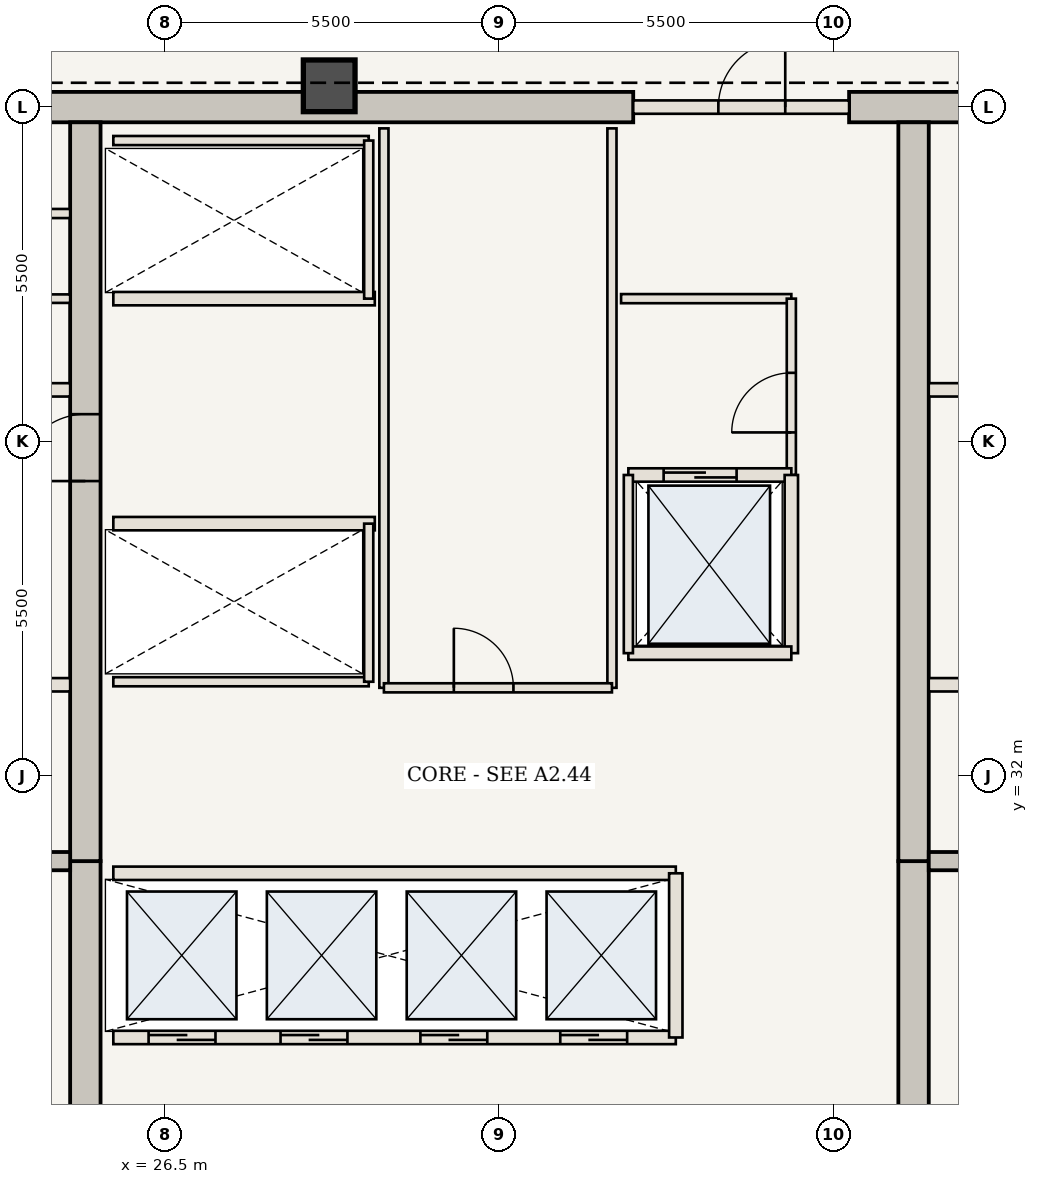
"""IFC4 building model, lengths in metres.
Left out: names, types, materials, properties, quantities, classifications, styles, units other than length and angle.
Written with IfcOpenShell. Run it as: python <this file> out.ifc"""

import sys

from ifc_helpers import new_model, si_unit, direction, frame, frame_2d, origin, origin_2d, place, context, subcontext, project, spatial, rectangle, extrude, element, fill, save


model = new_model("IFC4")
c1 = context("Model", 3, precision=1e-05, world=origin(), true_north=direction((0.0, 1.0)))
c2 = subcontext(c1, "Body", "Model", "MODEL_VIEW")
j1 = project(units=[si_unit("LENGTHUNIT", "METRE"), si_unit("PLANEANGLEUNIT", "RADIAN")], contexts=[c1])
p1 = place(None, origin())
s1 = spatial("IfcSite", under=j1, at=p1, CompositionType="ELEMENT")
p2 = place(p1, origin())
s2 = spatial("IfcBuilding", under=s1, at=p2, CompositionType="ELEMENT")
p3 = place(p2, frame((0.0, 0.0, 198.45)))
s3 = spatial("IfcBuildingStorey", under=s2, at=p3, CompositionType="ELEMENT", Elevation=198.45)
p4 = place(p3, frame((21.41, 43.0, 0.0), z_axis=(0.0, 0.0, 1.0), x_axis=(1.0, 0.0, 0.0)))
e1 = element("IfcWall", 1, at=p4, inside=s3, PredefinedType="SHEAR", context=c2, shape_type="SweptSolid", body=[
    extrude(rectangle(XDim=12.79, YDim=0.5, at=frame_2d((6.395, 0.0))), origin(), (0.0, 0.0, 1.0), 3.85),
])
p5 = place(p3, frame((37.75, 43.0, 0.0), z_axis=(0.0, 0.0, 1.0), x_axis=(1.0, 0.0, 0.0)))
e2 = element("IfcWall", 2, at=p5, inside=s3, PredefinedType="SHEAR", context=c2, shape_type="SweptSolid", body=[
    extrude(rectangle(XDim=4.84, YDim=0.5, at=frame_2d((2.42, 0.0))), origin(), (0.0, 0.0, 1.0), 3.85),
])
p6 = place(p3, frame((25.19, 21.2, 0.0), z_axis=(0.0, 0.0, 1.0), x_axis=(0.0, 1.0, 0.0)))
e3 = element("IfcWall", 3, at=p6, inside=s3, PredefinedType="SHEAR", context=c2, shape_type="SweptSolid", body=[
    extrude(rectangle(XDim=9.4, YDim=0.5, at=frame_2d((4.7, 0.0))), origin(), (0.0, 0.0, 1.0), 3.85),
])
p7 = place(p3, frame((25.19, 30.6, 0.0), z_axis=(0.0, 0.0, 1.0), x_axis=(0.0, 1.0, 0.0)))
e4 = element("IfcWall", 4, at=p7, inside=s3, PredefinedType="SHEAR", context=c2, shape_type="SweptSolid", body=[
    extrude(rectangle(XDim=12.15, YDim=0.5, at=frame_2d((6.075, 0.0))), origin(), (0.0, 0.0, 1.0), 3.85),
])
p8 = place(p7, frame((6.25, 0.0, 0.0)))
e5 = element("IfcOpeningElement", 5, at=p8, cuts=e4, PredefinedType="OPENING", context=c2, shape_type="SweptSolid", body=[
    extrude(rectangle(XDim=1.1, YDim=2.15, at=frame_2d((0.55, 1.075))), frame((0.0, 0.26, 0.0), z_axis=(0.0, -1.0, 0.0), x_axis=(1.0, 0.0, 0.0)), (0.0, 0.0, 1.0), 0.52),
])
p9 = place(p3, frame((38.81, 21.2, 0.0), z_axis=(0.0, 0.0, 1.0), x_axis=(0.0, 1.0, 0.0)))
e6 = element("IfcWall", 6, at=p9, inside=s3, PredefinedType="SHEAR", context=c2, shape_type="SweptSolid", body=[
    extrude(rectangle(XDim=9.4, YDim=0.5, at=frame_2d((4.7, 0.0))), origin(), (0.0, 0.0, 1.0), 3.85),
])
p10 = place(p3, frame((38.81, 30.6, 0.0), z_axis=(0.0, 0.0, 1.0), x_axis=(0.0, 1.0, 0.0)))
e7 = element("IfcWall", 7, at=p10, inside=s3, PredefinedType="SHEAR", context=c2, shape_type="SweptSolid", body=[
    extrude(rectangle(XDim=12.15, YDim=0.5, at=frame_2d((6.075, 0.0))), origin(), (0.0, 0.0, 1.0), 3.85),
])
p11 = place(p3, frame((29.2, 43.35, 0.0), z_axis=(0.0, 0.0, 1.0), x_axis=(1.0, 0.0, 0.0)))
e8 = element("IfcColumn", 8, at=p11, inside=s3, PredefinedType="COLUMN", context=c2, shape_type="SweptSolid", body=[
    extrude(rectangle(XDim=0.85, YDim=0.85, at=origin_2d()), origin(), (0.0, 0.0, 1.0), 3.85),
])
for number, where, z_axis, x_axis in (
    (9, (21.41, 30.6, 0.0), (0.0, 0.0, 1.0), (1.0, 0.0, 0.0)),
    (10, (39.06, 30.6, 0.0), (0.0, 0.0, 1.0), (1.0, 0.0, 0.0)),
):
    element("IfcWall", number, at=place(p3, frame(where, z_axis=z_axis, x_axis=x_axis)), inside=s3, PredefinedType="SHEAR", context=c2, shape_type="SweptSolid", body=[
        extrude(rectangle(XDim=3.53, YDim=0.3, at=frame_2d((1.765, 0.0))), origin(), (0.0, 0.0, 1.0), 3.685),
    ])
p12 = place(p3, frame((21.41, 33.5, 0.0), z_axis=(0.0, 0.0, 1.0), x_axis=(1.0, 0.0, 0.0)))
e11 = element("IfcWall", 11, at=p12, inside=s3, PredefinedType="STANDARD", context=c2, shape_type="SweptSolid", body=[
    extrude(rectangle(XDim=3.53, YDim=0.22, at=frame_2d((1.765, 0.0))), origin(), (0.0, 0.0, 1.0), 3.685),
])
p13 = place(p12, frame((0.75, 0.0, 0.0)))
e12 = element("IfcOpeningElement", 12, at=p13, cuts=e11, PredefinedType="OPENING", context=c2, shape_type="SweptSolid", body=[
    extrude(rectangle(XDim=1.2, YDim=2.2, at=frame_2d((0.6, 1.1))), frame((0.0, 0.12, 0.0), z_axis=(0.0, -1.0, 0.0), x_axis=(1.0, 0.0, 0.0)), (0.0, 0.0, 1.0), 0.24),
])
p14 = place(p3, frame((39.06, 33.5, 0.0), z_axis=(0.0, 0.0, 1.0), x_axis=(1.0, 0.0, 0.0)))
e13 = element("IfcWall", 13, at=p14, inside=s3, PredefinedType="STANDARD", context=c2, shape_type="SweptSolid", body=[
    extrude(rectangle(XDim=3.53, YDim=0.22, at=frame_2d((1.765, 0.0))), origin(), (0.0, 0.0, 1.0), 3.685),
])
p15 = place(p14, frame((1.55, 0.0, 0.0)))
e14 = element("IfcOpeningElement", 14, at=p15, cuts=e13, PredefinedType="OPENING", context=c2, shape_type="SweptSolid", body=[
    extrude(rectangle(XDim=1.2, YDim=2.2, at=frame_2d((0.6, 1.1))), frame((0.0, 0.12, 0.0), z_axis=(0.0, -1.0, 0.0), x_axis=(1.0, 0.0, 0.0)), (0.0, 0.0, 1.0), 0.24),
])
for number, where, z_axis, x_axis in (
    (15, (21.41, 38.35, 0.0), (0.0, 0.0, 1.0), (1.0, 0.0, 0.0)),
    (16, (39.06, 38.35, 0.0), (0.0, 0.0, 1.0), (1.0, 0.0, 0.0)),
):
    element("IfcWall", number, at=place(p3, frame(where, z_axis=z_axis, x_axis=x_axis)), inside=s3, PredefinedType="STANDARD", context=c2, shape_type="SweptSolid", body=[
        extrude(rectangle(XDim=3.53, YDim=0.22, at=frame_2d((1.765, 0.0))), origin(), (0.0, 0.0, 1.0), 3.685),
    ])
p16 = place(p3, frame((21.41, 39.85, 0.0), z_axis=(0.0, 0.0, 1.0), x_axis=(1.0, 0.0, 0.0)))
e17 = element("IfcWall", 17, at=p16, inside=s3, PredefinedType="STANDARD", context=c2, shape_type="SweptSolid", body=[
    extrude(rectangle(XDim=3.53, YDim=0.14, at=frame_2d((1.765, 0.0))), origin(), (0.0, 0.0, 1.0), 3.685),
])
p17 = place(p3, frame((21.41, 41.25, 0.0), z_axis=(0.0, 0.0, 1.0), x_axis=(1.0, 0.0, 0.0)))
e18 = element("IfcWall", 18, at=p17, inside=s3, PredefinedType="STANDARD", context=c2, shape_type="SweptSolid", body=[
    extrude(rectangle(XDim=3.53, YDim=0.15, at=frame_2d((1.765, 0.0))), origin(), (0.0, 0.0, 1.0), 3.685),
])
p18 = place(p3, frame((34.0, 39.85, 0.0), z_axis=(0.0, 0.0, 1.0), x_axis=(1.0, 0.0, 0.0)))
e19 = element("IfcWall", 19, at=p18, inside=s3, PredefinedType="STANDARD", context=c2, shape_type="SweptSolid", body=[
    extrude(rectangle(XDim=2.8, YDim=0.15, at=frame_2d((1.4, 0.0))), origin(), (0.0, 0.0, 1.0), 3.685),
])
p19 = place(p3, frame((36.8, 36.95, 0.0), z_axis=(0.0, 0.0, 1.0), x_axis=(0.0, 1.0, 0.0)))
e20 = element("IfcWall", 20, at=p19, inside=s3, PredefinedType="STANDARD", context=c2, shape_type="SweptSolid", body=[
    extrude(rectangle(XDim=2.9, YDim=0.15, at=frame_2d((1.45, 0.0))), origin(), (0.0, 0.0, 1.0), 3.685),
])
p20 = place(p19, frame((0.7, 0.0, 0.0)))
e21 = element("IfcOpeningElement", 21, at=p20, cuts=e20, PredefinedType="OPENING", context=c2, shape_type="SweptSolid", body=[
    extrude(rectangle(XDim=0.98, YDim=2.2, at=frame_2d((0.49, 1.1))), frame((0.0, 0.085, 0.0), z_axis=(0.0, -1.0, 0.0), x_axis=(1.0, 0.0, 0.0)), (0.0, 0.0, 1.0), 0.17),
])
p21 = place(p3, frame((25.65, 27.7, 0.0), z_axis=(0.0, 0.0, 1.0), x_axis=(1.0, 0.0, 0.0)))
e22 = element("IfcWall", 22, at=p21, inside=s3, PredefinedType="STANDARD", context=c2, shape_type="SweptSolid", body=[
    extrude(rectangle(XDim=9.25, YDim=0.22, at=frame_2d((4.625, 0.0))), origin(), (0.0, 0.0, 1.0), 3.685),
])
p22 = place(p21, frame((0.58, 0.0, 0.0)))
e23 = element("IfcOpeningElement", 23, at=p22, cuts=e22, PredefinedType="OPENING", context=c2, shape_type="SweptSolid", body=[
    extrude(rectangle(XDim=1.1, YDim=2.15, at=frame_2d((0.55, 1.075))), frame((0.0, 0.12, 0.0), z_axis=(0.0, -1.0, 0.0), x_axis=(1.0, 0.0, 0.0)), (0.0, 0.0, 1.0), 0.24),
])
p23 = place(p21, frame((2.75, 0.0, 0.0)))
e24 = element("IfcOpeningElement", 24, at=p23, cuts=e22, PredefinedType="OPENING", context=c2, shape_type="SweptSolid", body=[
    extrude(rectangle(XDim=1.1, YDim=2.15, at=frame_2d((0.55, 1.075))), frame((0.0, 0.12, 0.0), z_axis=(0.0, -1.0, 0.0), x_axis=(1.0, 0.0, 0.0)), (0.0, 0.0, 1.0), 0.24),
])
p24 = place(p21, frame((5.05, 0.0, 0.0)))
e25 = element("IfcOpeningElement", 25, at=p24, cuts=e22, PredefinedType="OPENING", context=c2, shape_type="SweptSolid", body=[
    extrude(rectangle(XDim=1.1, YDim=2.15, at=frame_2d((0.55, 1.075))), frame((0.0, 0.12, 0.0), z_axis=(0.0, -1.0, 0.0), x_axis=(1.0, 0.0, 0.0)), (0.0, 0.0, 1.0), 0.24),
])
p25 = place(p21, frame((7.35, 0.0, 0.0)))
e26 = element("IfcOpeningElement", 26, at=p25, cuts=e22, PredefinedType="OPENING", context=c2, shape_type="SweptSolid", body=[
    extrude(rectangle(XDim=1.1, YDim=2.15, at=frame_2d((0.55, 1.075))), frame((0.0, 0.12, 0.0), z_axis=(0.0, -1.0, 0.0), x_axis=(1.0, 0.0, 0.0)), (0.0, 0.0, 1.0), 0.24),
])
p26 = place(p3, frame((25.65, 30.4, 0.0), z_axis=(0.0, 0.0, 1.0), x_axis=(1.0, 0.0, 0.0)))
e27 = element("IfcWall", 27, at=p26, inside=s3, PredefinedType="STANDARD", context=c2, shape_type="SweptSolid", body=[
    extrude(rectangle(XDim=9.25, YDim=0.22, at=frame_2d((4.625, 0.0))), origin(), (0.0, 0.0, 1.0), 3.685),
])
p27 = place(p3, frame((34.9, 27.7, 0.0), z_axis=(0.0, 0.0, 1.0), x_axis=(0.0, 1.0, 0.0)))
e28 = element("IfcWall", 28, at=p27, inside=s3, PredefinedType="STANDARD", context=c2, shape_type="SweptSolid", body=[
    extrude(rectangle(XDim=2.7, YDim=0.22, at=frame_2d((1.35, 0.0))), origin(), (0.0, 0.0, 1.0), 3.685),
])
p28 = place(p3, frame((25.65, 36.15, 0.0), z_axis=(0.0, 0.0, 1.0), x_axis=(1.0, 0.0, 0.0)))
e29 = element("IfcWall", 29, at=p28, inside=s3, PredefinedType="STANDARD", context=c2, shape_type="SweptSolid", body=[
    extrude(rectangle(XDim=4.3, YDim=0.22, at=frame_2d((2.15, 0.0))), origin(), (0.0, 0.0, 1.0), 3.685),
])
p29 = place(p3, frame((25.65, 33.55, 0.0), z_axis=(0.0, 0.0, 1.0), x_axis=(1.0, 0.0, 0.0)))
e30 = element("IfcWall", 30, at=p29, inside=s3, PredefinedType="STANDARD", context=c2, shape_type="SweptSolid", body=[
    extrude(rectangle(XDim=4.2, YDim=0.15, at=frame_2d((2.1, 0.0))), origin(), (0.0, 0.0, 1.0), 3.685),
])
p30 = place(p3, frame((29.85, 33.55, 0.0), z_axis=(0.0, 0.0, 1.0), x_axis=(0.0, 1.0, 0.0)))
e31 = element("IfcWall", 31, at=p30, inside=s3, PredefinedType="STANDARD", context=c2, shape_type="SweptSolid", body=[
    extrude(rectangle(XDim=2.6, YDim=0.15, at=frame_2d((1.3, 0.0))), origin(), (0.0, 0.0, 1.0), 3.685),
])
p31 = place(p3, frame((25.65, 39.85, 0.0), z_axis=(0.0, 0.0, 1.0), x_axis=(1.0, 0.0, 0.0)))
e32 = element("IfcWall", 32, at=p31, inside=s3, PredefinedType="STANDARD", context=c2, shape_type="SweptSolid", body=[
    extrude(rectangle(XDim=4.3, YDim=0.22, at=frame_2d((2.15, 0.0))), origin(), (0.0, 0.0, 1.0), 3.685),
])
p32 = place(p3, frame((25.65, 42.45, 0.0), z_axis=(0.0, 0.0, 1.0), x_axis=(1.0, 0.0, 0.0)))
e33 = element("IfcWall", 33, at=p32, inside=s3, PredefinedType="STANDARD", context=c2, shape_type="SweptSolid", body=[
    extrude(rectangle(XDim=4.2, YDim=0.15, at=frame_2d((2.1, 0.0))), origin(), (0.0, 0.0, 1.0), 3.685),
])
p33 = place(p3, frame((29.85, 39.85, 0.0), z_axis=(0.0, 0.0, 1.0), x_axis=(0.0, 1.0, 0.0)))
e34 = element("IfcWall", 34, at=p33, inside=s3, PredefinedType="STANDARD", context=c2, shape_type="SweptSolid", body=[
    extrude(rectangle(XDim=2.6, YDim=0.15, at=frame_2d((1.3, 0.0))), origin(), (0.0, 0.0, 1.0), 3.685),
])
for number, where, z_axis, x_axis in (
    (35, (30.1, 33.45, 0.0), (0.0, 0.0, 1.0), (0.0, 1.0, 0.0)),
    (36, (33.85, 33.45, 0.0), (0.0, 0.0, 1.0), (0.0, 1.0, 0.0)),
):
    element("IfcWall", number, at=place(p3, frame(where, z_axis=z_axis, x_axis=x_axis)), inside=s3, PredefinedType="STANDARD", context=c2, shape_type="SweptSolid", body=[
        extrude(rectangle(XDim=9.2, YDim=0.15, at=frame_2d((4.6, 0.0))), origin(), (0.0, 0.0, 1.0), 3.685),
    ])
p34 = place(p3, frame((30.1, 33.45, 0.0), z_axis=(0.0, 0.0, 1.0), x_axis=(1.0, 0.0, 0.0)))
e37 = element("IfcWall", 37, at=p34, inside=s3, PredefinedType="STANDARD", context=c2, shape_type="SweptSolid", body=[
    extrude(rectangle(XDim=3.75, YDim=0.15, at=frame_2d((1.875, 0.0))), origin(), (0.0, 0.0, 1.0), 3.685),
])
p35 = place(p34, frame((1.15, 0.0, 0.0)))
e38 = element("IfcOpeningElement", 38, at=p35, cuts=e37, PredefinedType="OPENING", context=c2, shape_type="SweptSolid", body=[
    extrude(rectangle(XDim=0.98, YDim=2.2, at=frame_2d((0.49, 1.1))), frame((0.0, 0.085, 0.0), z_axis=(0.0, -1.0, 0.0), x_axis=(1.0, 0.0, 0.0)), (0.0, 0.0, 1.0), 0.17),
])
p36 = place(p3, frame((34.2, 43.0, 0.0), z_axis=(0.0, 0.0, 1.0), x_axis=(1.0, 0.0, 0.0)))
e39 = element("IfcWall", 39, at=p36, inside=s3, PredefinedType="STANDARD", context=c2, shape_type="SweptSolid", body=[
    extrude(rectangle(XDim=3.55, YDim=0.22, at=frame_2d((1.775, 0.0))), origin(), (0.0, 0.0, 1.0), 3.685),
])
p37 = place(p36, frame((1.4, 0.0, 0.0)))
e40 = element("IfcOpeningElement", 40, at=p37, cuts=e39, PredefinedType="OPENING", context=c2, shape_type="SweptSolid", body=[
    extrude(rectangle(XDim=1.1, YDim=2.15, at=frame_2d((0.55, 1.075))), frame((0.0, 0.12, 0.0), z_axis=(0.0, -1.0, 0.0), x_axis=(1.0, 0.0, 0.0)), (0.0, 0.0, 1.0), 0.24),
])
p38 = place(p3, frame((34.12, 36.95, 0.0), z_axis=(0.0, 0.0, 1.0), x_axis=(1.0, 0.0, 0.0)))
e41 = element("IfcWall", 41, at=p38, inside=s3, PredefinedType="STANDARD", context=c2, shape_type="SweptSolid", body=[
    extrude(rectangle(XDim=2.68, YDim=0.22, at=frame_2d((1.34, 0.0))), origin(), (0.0, 0.0, 1.0), 3.685),
])
p39 = place(p38, frame((0.58, 0.0, 0.0)))
e42 = element("IfcOpeningElement", 42, at=p39, cuts=e41, PredefinedType="OPENING", context=c2, shape_type="SweptSolid", body=[
    extrude(rectangle(XDim=1.2, YDim=2.2, at=frame_2d((0.6, 1.1))), frame((0.0, 0.12, 0.0), z_axis=(0.0, -1.0, 0.0), x_axis=(1.0, 0.0, 0.0)), (0.0, 0.0, 1.0), 0.24),
])
p40 = place(p3, frame((36.8, 34.02, 0.0), z_axis=(0.0, 0.0, 1.0), x_axis=(0.0, 1.0, 0.0)))
e43 = element("IfcWall", 43, at=p40, inside=s3, PredefinedType="STANDARD", context=c2, shape_type="SweptSolid", body=[
    extrude(rectangle(XDim=2.93, YDim=0.22, at=frame_2d((1.465, 0.0))), origin(), (0.0, 0.0, 1.0), 3.685),
])
p41 = place(p3, frame((34.12, 34.02, 0.0), z_axis=(0.0, 0.0, 1.0), x_axis=(1.0, 0.0, 0.0)))
e44 = element("IfcWall", 44, at=p41, inside=s3, PredefinedType="STANDARD", context=c2, shape_type="SweptSolid", body=[
    extrude(rectangle(XDim=2.68, YDim=0.22, at=frame_2d((1.34, 0.0))), origin(), (0.0, 0.0, 1.0), 3.685),
])
p42 = place(p3, frame((34.12, 34.02, 0.0), z_axis=(0.0, 0.0, 1.0), x_axis=(0.0, 1.0, 0.0)))
e45 = element("IfcWall", 45, at=p42, inside=s3, PredefinedType="STANDARD", context=c2, shape_type="SweptSolid", body=[
    extrude(rectangle(XDim=2.93, YDim=0.15, at=frame_2d((1.465, 0.0))), origin(), (0.0, 0.0, 1.0), 3.685),
])
p43 = place(p8, origin())
e46 = element("IfcDoor", 46, at=p43, inside=s3, OperationType="SINGLE_SWING_LEFT", PredefinedType="DOOR", context=c2, shape_type="SweptSolid", body=[
    extrude(rectangle(XDim=1.1, YDim=2.15, at=frame_2d((0.55, 1.075))), frame((0.0, 0.025, 0.0), z_axis=(0.0, -1.0, 0.0), x_axis=(1.0, 0.0, 0.0)), (0.0, 0.0, 1.0), 0.05),
])
fill(e5, e46)
p44 = place(p20, origin())
e47 = element("IfcDoor", 47, at=p44, inside=s3, OperationType="SINGLE_SWING_LEFT", PredefinedType="DOOR", context=c2, shape_type="SweptSolid", body=[
    extrude(rectangle(XDim=0.98, YDim=2.2, at=frame_2d((0.49, 1.1))), frame((0.0, 0.025, 0.0), z_axis=(0.0, -1.0, 0.0), x_axis=(1.0, 0.0, 0.0)), (0.0, 0.0, 1.0), 0.05),
])
fill(e21, e47)
p45 = place(p22, origin())
e48 = element("IfcDoor", 48, at=p45, inside=s3, OperationType="DOUBLE_DOOR_SLIDING", PredefinedType="DOOR", context=c2, shape_type="SweptSolid", body=[
    extrude(rectangle(XDim=1.1, YDim=2.15, at=frame_2d((0.55, 1.075))), frame((0.0, 0.025, 0.0), z_axis=(0.0, -1.0, 0.0), x_axis=(1.0, 0.0, 0.0)), (0.0, 0.0, 1.0), 0.05),
])
fill(e23, e48)
p46 = place(p23, origin())
e49 = element("IfcDoor", 49, at=p46, inside=s3, OperationType="DOUBLE_DOOR_SLIDING", PredefinedType="DOOR", context=c2, shape_type="SweptSolid", body=[
    extrude(rectangle(XDim=1.1, YDim=2.15, at=frame_2d((0.55, 1.075))), frame((0.0, 0.025, 0.0), z_axis=(0.0, -1.0, 0.0), x_axis=(1.0, 0.0, 0.0)), (0.0, 0.0, 1.0), 0.05),
])
fill(e24, e49)
p47 = place(p24, origin())
e50 = element("IfcDoor", 50, at=p47, inside=s3, OperationType="DOUBLE_DOOR_SLIDING", PredefinedType="DOOR", context=c2, shape_type="SweptSolid", body=[
    extrude(rectangle(XDim=1.1, YDim=2.15, at=frame_2d((0.55, 1.075))), frame((0.0, 0.025, 0.0), z_axis=(0.0, -1.0, 0.0), x_axis=(1.0, 0.0, 0.0)), (0.0, 0.0, 1.0), 0.05),
])
fill(e25, e50)
p48 = place(p25, origin())
e51 = element("IfcDoor", 51, at=p48, inside=s3, OperationType="DOUBLE_DOOR_SLIDING", PredefinedType="DOOR", context=c2, shape_type="SweptSolid", body=[
    extrude(rectangle(XDim=1.1, YDim=2.15, at=frame_2d((0.55, 1.075))), frame((0.0, 0.025, 0.0), z_axis=(0.0, -1.0, 0.0), x_axis=(1.0, 0.0, 0.0)), (0.0, 0.0, 1.0), 0.05),
])
fill(e26, e51)
p49 = place(p35, origin())
e52 = element("IfcDoor", 52, at=p49, inside=s3, OperationType="SINGLE_SWING_LEFT", PredefinedType="DOOR", context=c2, shape_type="SweptSolid", body=[
    extrude(rectangle(XDim=0.98, YDim=2.2, at=frame_2d((0.49, 1.1))), frame((0.0, 0.025, 0.0), z_axis=(0.0, -1.0, 0.0), x_axis=(1.0, 0.0, 0.0)), (0.0, 0.0, 1.0), 0.05),
])
fill(e38, e52)
p50 = place(p37, origin())
e53 = element("IfcDoor", 53, at=p50, inside=s3, OperationType="SINGLE_SWING_RIGHT", PredefinedType="DOOR", context=c2, shape_type="SweptSolid", body=[
    extrude(rectangle(XDim=1.1, YDim=2.15, at=frame_2d((0.55, 1.075))), frame((0.0, 0.025, 0.0), z_axis=(0.0, -1.0, 0.0), x_axis=(1.0, 0.0, 0.0)), (0.0, 0.0, 1.0), 0.05),
])
fill(e40, e53)
p51 = place(p39, origin())
e54 = element("IfcDoor", 54, at=p51, inside=s3, OperationType="DOUBLE_DOOR_SLIDING", PredefinedType="DOOR", context=c2, shape_type="SweptSolid", body=[
    extrude(rectangle(XDim=1.2, YDim=2.2, at=frame_2d((0.6, 1.1))), frame((0.0, 0.025, 0.0), z_axis=(0.0, -1.0, 0.0), x_axis=(1.0, 0.0, 0.0)), (0.0, 0.0, 1.0), 0.05),
])
fill(e42, e54)
save(model, sys.argv[1])
